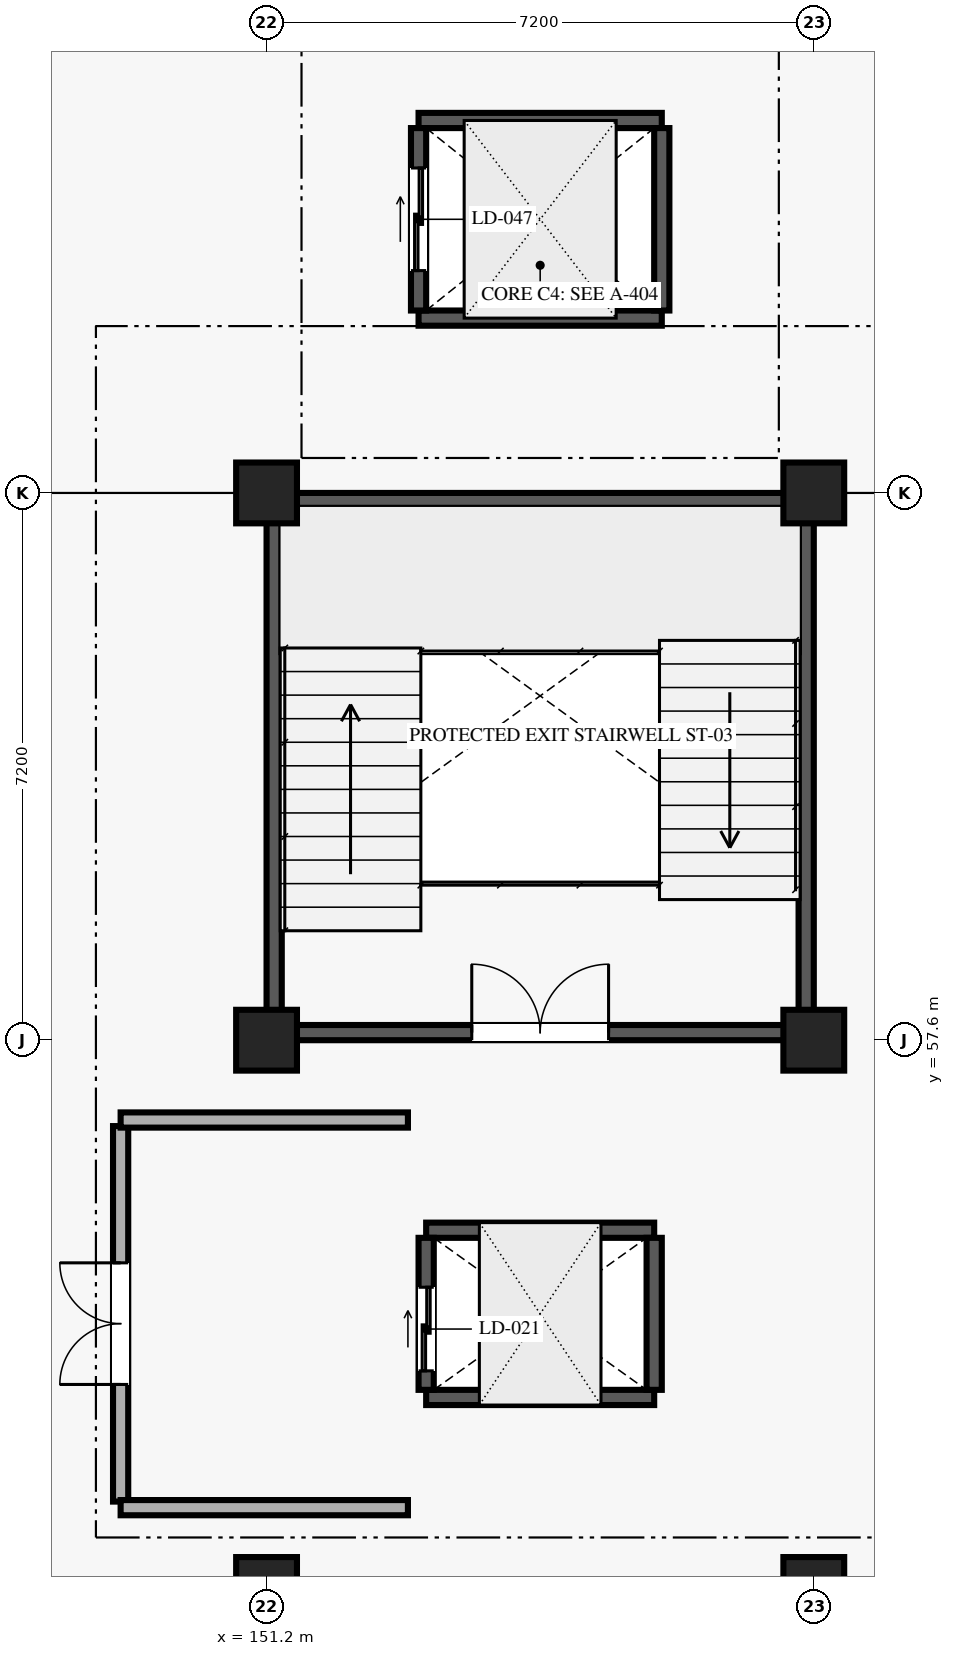
"""IFC4 building model, lengths in metres.
Left out: names, types, materials, properties, quantities, classifications, styles, units other than length and angle.
Written with IfcOpenShell. Run it as: python <this file> out.ifc"""

import sys

from ifc_helpers import new_model, si_unit, direction, frame, frame_2d, origin, origin_2d, place, context, subcontext, project, spatial, rectangle, extrude, element, fill, save


model = new_model("IFC4")
c1 = context("Model", 3, precision=1e-05, world=origin(), true_north=direction((0.0, 1.0)))
c2 = subcontext(c1, "Body", "Model", "MODEL_VIEW")
j1 = project(units=[si_unit("LENGTHUNIT", "METRE"), si_unit("PLANEANGLEUNIT", "RADIAN")], contexts=[c1])
p1 = place(None, origin())
s1 = spatial("IfcSite", under=j1, at=p1, CompositionType="ELEMENT")
p2 = place(p1, origin())
s2 = spatial("IfcBuilding", under=s1, at=p2, CompositionType="ELEMENT")
p3 = place(p2, frame((0.0, 0.0, 5.4)))
s3 = spatial("IfcBuildingStorey", under=s2, at=p3, CompositionType="ELEMENT", Elevation=5.4)
for number, where, z_axis, x_axis in (
    (1, (151.2, 50.4, 0.0), (0.0, 0.0, 1.0), (1.0, 0.0, 0.0)),
    (2, (151.2, 57.6, 0.0), (0.0, 0.0, 1.0), (1.0, 0.0, 0.0)),
    (3, (151.2, 64.8, 0.0), (0.0, 0.0, 1.0), (1.0, 0.0, 0.0)),
    (4, (158.4, 50.4, 0.0), (0.0, 0.0, 1.0), (1.0, 0.0, 0.0)),
    (5, (158.4, 57.6, 0.0), (0.0, 0.0, 1.0), (1.0, 0.0, 0.0)),
    (6, (158.4, 64.8, 0.0), (0.0, 0.0, 1.0), (1.0, 0.0, 0.0)),
):
    element("IfcColumn", number, at=place(p3, frame(where, z_axis=z_axis, x_axis=x_axis)), inside=s3, PredefinedType="COLUMN", context=c2, shape_type="SweptSolid", body=[
        extrude(rectangle(XDim=0.8, YDim=0.8, at=origin_2d()), origin(), (0.0, 0.0, 1.0), 4.05),
    ])
p4 = place(p3, frame((151.4, 57.7, 0.0), z_axis=(0.0, 0.0, 1.0), x_axis=(1.0, 0.0, 0.0)))
e7 = element("IfcWall", 7, at=p4, inside=s3, PredefinedType="SHEAR", context=c2, shape_type="SweptSolid", body=[
    extrude(rectangle(XDim=6.8, YDim=0.2, at=frame_2d((3.4, 0.0))), origin(), (0.0, 0.0, 1.0), 3.81),
])
p5 = place(p4, frame((2.5, 0.0, 0.0)))
e8 = element("IfcOpeningElement", 8, at=p5, cuts=e7, PredefinedType="OPENING", context=c2, shape_type="SweptSolid", body=[
    extrude(rectangle(XDim=1.8, YDim=2.2, at=frame_2d((0.9, 1.1))), frame((0.0, 0.11, 0.0), z_axis=(0.0, -1.0, 0.0), x_axis=(1.0, 0.0, 0.0)), (0.0, 0.0, 1.0), 0.22),
])
for number, where, z_axis, x_axis in (
    (9, (151.4, 64.7, 0.0), (0.0, 0.0, 1.0), (1.0, 0.0, 0.0)),
    (10, (151.3, 57.8, 0.0), (0.0, 0.0, 1.0), (0.0, 1.0, 0.0)),
    (11, (158.3, 57.8, 0.0), (0.0, 0.0, 1.0), (0.0, 1.0, 0.0)),
):
    element("IfcWall", number, at=place(p3, frame(where, z_axis=z_axis, x_axis=x_axis)), inside=s3, PredefinedType="SHEAR", context=c2, shape_type="SweptSolid", body=[
        extrude(rectangle(XDim=6.8, YDim=0.2, at=frame_2d((3.4, 0.0))), origin(), (0.0, 0.0, 1.0), 3.81),
    ])
for number, where, z_axis, x_axis in (
    (12, (153.3, 52.9, 0.0), (0.0, 0.0, 1.0), (1.0, 0.0, 0.0)),
    (13, (153.3, 55.1, 0.0), (0.0, 0.0, 1.0), (1.0, 0.0, 0.0)),
):
    element("IfcWall", number, at=place(p3, frame(where, z_axis=z_axis, x_axis=x_axis)), inside=s3, PredefinedType="SHEAR", context=c2, shape_type="SweptSolid", body=[
        extrude(rectangle(XDim=3.0, YDim=0.2, at=frame_2d((1.5, 0.0))), origin(), (0.0, 0.0, 1.0), 3.81),
    ])
p6 = place(p3, frame((153.3, 53.0, 0.0), z_axis=(0.0, 0.0, 1.0), x_axis=(0.0, 1.0, 0.0)))
e14 = element("IfcWall", 14, at=p6, inside=s3, PredefinedType="SHEAR", context=c2, shape_type="SweptSolid", body=[
    extrude(rectangle(XDim=2.0, YDim=0.2, at=frame_2d((1.0, 0.0))), origin(), (0.0, 0.0, 1.0), 3.81),
])
p7 = place(p6, frame((0.25, 0.0, 0.0)))
e15 = element("IfcOpeningElement", 15, at=p7, cuts=e14, PredefinedType="OPENING", context=c2, shape_type="SweptSolid", body=[
    extrude(rectangle(XDim=1.1, YDim=2.15, at=frame_2d((0.55, 1.075))), frame((0.0, 0.11, 0.0), z_axis=(0.0, -1.0, 0.0), x_axis=(1.0, 0.0, 0.0)), (0.0, 0.0, 1.0), 0.22),
])
p8 = place(p3, frame((156.3, 53.0, 0.0), z_axis=(0.0, 0.0, 1.0), x_axis=(0.0, 1.0, 0.0)))
e16 = element("IfcWall", 16, at=p8, inside=s3, PredefinedType="SHEAR", context=c2, shape_type="SweptSolid", body=[
    extrude(rectangle(XDim=2.0, YDim=0.2, at=frame_2d((1.0, 0.0))), origin(), (0.0, 0.0, 1.0), 3.81),
])
for number, where, z_axis, x_axis in (
    (17, (153.2, 67.1, 0.0), (0.0, 0.0, 1.0), (1.0, 0.0, 0.0)),
    (18, (153.2, 69.7, 0.0), (0.0, 0.0, 1.0), (1.0, 0.0, 0.0)),
):
    element("IfcWall", number, at=place(p3, frame(where, z_axis=z_axis, x_axis=x_axis)), inside=s3, PredefinedType="SHEAR", context=c2, shape_type="SweptSolid", body=[
        extrude(rectangle(XDim=3.2, YDim=0.2, at=frame_2d((1.6, 0.0))), origin(), (0.0, 0.0, 1.0), 3.81),
    ])
p9 = place(p3, frame((153.2, 67.2, 0.0), z_axis=(0.0, 0.0, 1.0), x_axis=(0.0, 1.0, 0.0)))
e19 = element("IfcWall", 19, at=p9, inside=s3, PredefinedType="SHEAR", context=c2, shape_type="SweptSolid", body=[
    extrude(rectangle(XDim=2.4, YDim=0.2, at=frame_2d((1.2, 0.0))), origin(), (0.0, 0.0, 1.0), 3.81),
])
p10 = place(p9, frame((0.525, 0.0, 0.0)))
e20 = element("IfcOpeningElement", 20, at=p10, cuts=e19, PredefinedType="OPENING", context=c2, shape_type="SweptSolid", body=[
    extrude(rectangle(XDim=1.35, YDim=2.2, at=frame_2d((0.675, 1.1))), frame((0.0, 0.11, 0.0), z_axis=(0.0, -1.0, 0.0), x_axis=(1.0, 0.0, 0.0)), (0.0, 0.0, 1.0), 0.22),
])
p11 = place(p3, frame((156.4, 67.2, 0.0), z_axis=(0.0, 0.0, 1.0), x_axis=(0.0, 1.0, 0.0)))
e21 = element("IfcWall", 21, at=p11, inside=s3, PredefinedType="SHEAR", context=c2, shape_type="SweptSolid", body=[
    extrude(rectangle(XDim=2.4, YDim=0.2, at=frame_2d((1.2, 0.0))), origin(), (0.0, 0.0, 1.0), 3.81),
])
p12 = place(p3, frame((149.28, 51.53, 0.0), z_axis=(0.0, 0.0, 1.0), x_axis=(0.0, 1.0, 0.0)))
e22 = element("IfcWall", 22, at=p12, inside=s3, PredefinedType="SOLIDWALL", context=c2, shape_type="SweptSolid", body=[
    extrude(rectangle(XDim=4.94, YDim=0.2, at=frame_2d((2.47, 0.0))), origin(), (0.0, 0.0, 1.0), 3.81),
])
p13 = place(p12, frame((1.541, 0.0, 0.0)))
e23 = element("IfcOpeningElement", 23, at=p13, cuts=e22, PredefinedType="OPENING", context=c2, shape_type="SweptSolid", body=[
    extrude(rectangle(XDim=1.6, YDim=2.2, at=frame_2d((0.8, 1.1))), frame((0.0, 0.11, 0.0), z_axis=(0.0, -1.0, 0.0), x_axis=(1.0, 0.0, 0.0)), (0.0, 0.0, 1.0), 0.22),
])
for number, where, z_axis, x_axis in (
    (24, (149.28, 51.45, 0.0), (0.0, 0.0, 1.0), (1.0, 0.0, 0.0)),
    (25, (149.28, 56.55, 0.0), (0.0, 0.0, 1.0), (1.0, 0.0, 0.0)),
):
    element("IfcWall", number, at=place(p3, frame(where, z_axis=z_axis, x_axis=x_axis)), inside=s3, PredefinedType="SOLIDWALL", context=c2, shape_type="SweptSolid", body=[
        extrude(rectangle(XDim=3.78, YDim=0.2, at=frame_2d((1.89, 0.0))), origin(), (0.0, 0.0, 1.0), 3.81),
    ])
p14 = place(p5, origin())
e26 = element("IfcDoor", 26, at=p14, inside=s3, OperationType="DOUBLE_DOOR_SINGLE_SWING", PredefinedType="DOOR", context=c2, shape_type="SweptSolid", body=[
    extrude(rectangle(XDim=1.8, YDim=2.2, at=frame_2d((0.9, 1.1))), frame((0.0, 0.025, 0.0), z_axis=(0.0, -1.0, 0.0), x_axis=(1.0, 0.0, 0.0)), (0.0, 0.0, 1.0), 0.05),
])
fill(e8, e26)
p15 = place(p7, origin())
e27 = element("IfcDoor", 27, at=p15, inside=s3, OperationType="DOUBLE_DOOR_SLIDING", PredefinedType="DOOR", context=c2, shape_type="SweptSolid", body=[
    extrude(rectangle(XDim=1.1, YDim=2.15, at=frame_2d((0.55, 1.075))), frame((0.0, 0.025, 0.0), z_axis=(0.0, -1.0, 0.0), x_axis=(1.0, 0.0, 0.0)), (0.0, 0.0, 1.0), 0.05),
])
fill(e15, e27)
p16 = place(p10, origin())
e28 = element("IfcDoor", 28, at=p16, inside=s3, OperationType="DOUBLE_DOOR_SLIDING", PredefinedType="DOOR", context=c2, shape_type="SweptSolid", body=[
    extrude(rectangle(XDim=1.35, YDim=2.2, at=frame_2d((0.675, 1.1))), frame((0.0, 0.025, 0.0), z_axis=(0.0, -1.0, 0.0), x_axis=(1.0, 0.0, 0.0)), (0.0, 0.0, 1.0), 0.05),
])
fill(e20, e28)
p17 = place(p13, origin())
e29 = element("IfcDoor", 29, at=p17, inside=s3, OperationType="DOUBLE_DOOR_SINGLE_SWING", PredefinedType="DOOR", context=c2, shape_type="SweptSolid", body=[
    extrude(rectangle(XDim=1.6, YDim=2.2, at=frame_2d((0.8, 1.1))), frame((0.0, 0.025, 0.0), z_axis=(0.0, -1.0, 0.0), x_axis=(1.0, 0.0, 0.0)), (0.0, 0.0, 1.0), 0.05),
])
fill(e23, e29)
save(model, sys.argv[1])
